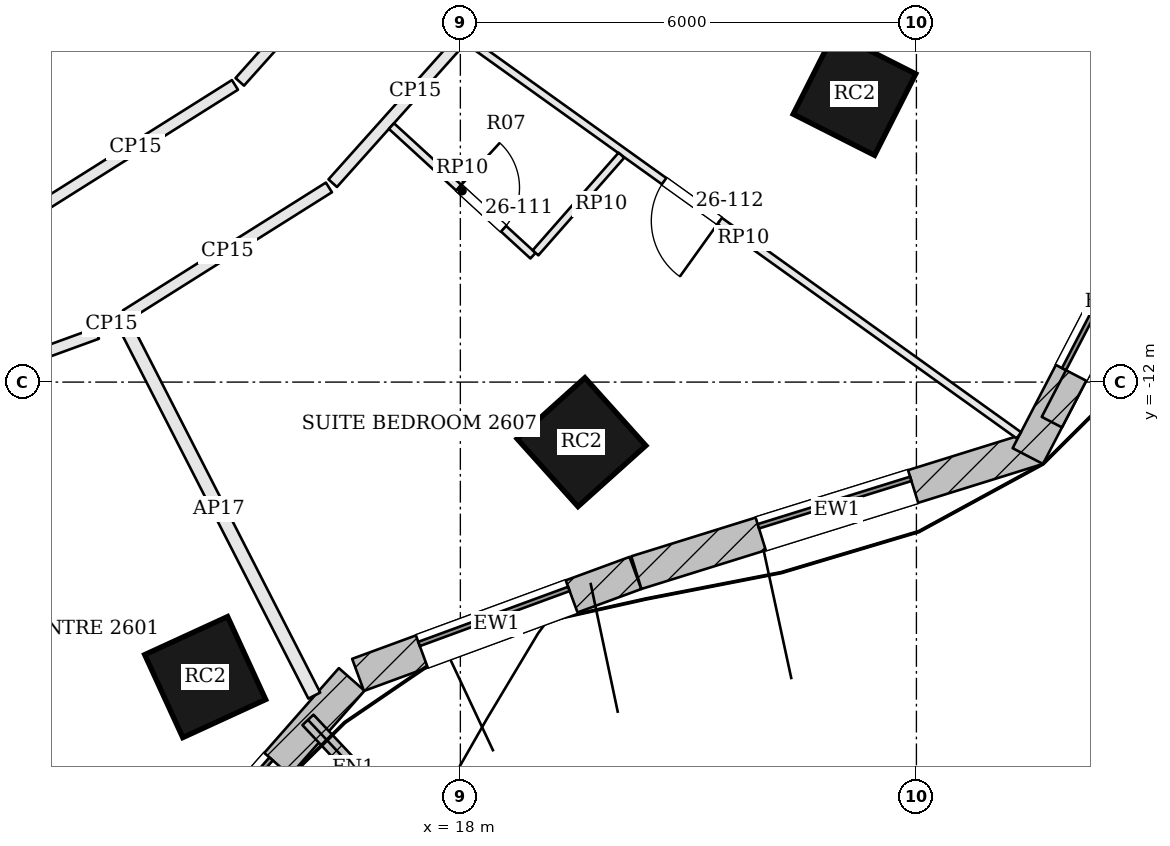
"""IFC4 building model, lengths in metres.
Left out: names, types, materials, properties, quantities, classifications, styles, units other than length and angle.
Written with IfcOpenShell. Run it as: python <this file> out.ifc"""

import sys

from ifc_helpers import new_model, si_unit, direction, frame, frame_2d, origin, origin_2d, place, context, subcontext, project, spatial, rectangle, extrude, element, fill, save


model = new_model("IFC4")
c1 = context("Model", 3, precision=1e-05, world=origin(), true_north=direction((0.0, 1.0)))
c2 = subcontext(c1, "Body", "Model", "MODEL_VIEW")
j1 = project(units=[si_unit("LENGTHUNIT", "METRE"), si_unit("PLANEANGLEUNIT", "RADIAN")], contexts=[c1])
p1 = place(None, origin())
s1 = spatial("IfcSite", under=j1, at=p1, CompositionType="ELEMENT")
p2 = place(p1, origin())
s2 = spatial("IfcBuilding", under=s1, at=p2, CompositionType="ELEMENT")
p3 = place(p2, frame((0.0, 0.0, 110.4)))
s3 = spatial("IfcBuildingStorey", under=s2, at=p3, CompositionType="ELEMENT", Elevation=110.4)
for number, where, z_axis, x_axis in (
    (1, (14.643, -15.881, 0.0), (0.0, 0.0, 1.0), (0.909, 0.417, 0.0)),
    (2, (19.593, -12.79, 0.0), (0.0, 0.0, 1.0), (0.744, 0.668, 0.0)),
    (3, (23.185, -8.21, 0.0), (0.0, 0.0, 1.0), (0.451, 0.893, 0.0)),
):
    element("IfcColumn", number, at=place(p3, frame(where, z_axis=z_axis, x_axis=x_axis)), inside=s3, PredefinedType="COLUMN", context=c2, shape_type="SweptSolid", body=[
        extrude(rectangle(XDim=1.2, YDim=1.2, at=origin_2d()), origin(), (0.0, 0.0, 1.0), 3.6),
    ])
p4 = place(p3, frame((13.221, -19.719, 0.0), z_axis=(0.0, 0.0, 1.0), x_axis=(0.660424908916, 0.750892095899, 0.0)))
e4 = element("IfcWall", 4, at=p4, inside=s3, PredefinedType="SOLIDWALL", context=c2, shape_type="SweptSolid", body=[
    extrude(rectangle(XDim=5.071, YDim=0.45, at=frame_2d((2.535, 0.0))), origin(), (0.0, 0.0, 1.0), 3.4),
])
p5 = place(p4, frame((1.485, 0.0, 0.9)))
e5 = element("IfcOpeningElement", 5, at=p5, cuts=e4, PredefinedType="OPENING", context=c2, shape_type="SweptSolid", body=[
    extrude(rectangle(XDim=2.1, YDim=2.0, at=frame_2d((1.05, 1.0))), frame((0.0, 0.235, 0.0), z_axis=(0.0, -1.0, 0.0), x_axis=(1.0, 0.0, 0.0)), (0.0, 0.0, 1.0), 0.47),
])
p6 = place(p3, frame((16.654, -15.852, 0.0), z_axis=(0.0, 0.0, 1.0), x_axis=(0.938636568132, 0.344907803572, 0.0)))
e6 = element("IfcWall", 6, at=p6, inside=s3, PredefinedType="SOLIDWALL", context=c2, shape_type="SweptSolid", body=[
    extrude(rectangle(XDim=3.887, YDim=0.45, at=frame_2d((1.944, 0.0))), origin(), (0.0, 0.0, 1.0), 3.4),
])
p7 = place(p6, frame((0.894, 0.0, 0.9)))
e7 = element("IfcOpeningElement", 7, at=p7, cuts=e6, PredefinedType="OPENING", context=c2, shape_type="SweptSolid", body=[
    extrude(rectangle(XDim=2.1, YDim=2.0, at=frame_2d((1.05, 1.0))), frame((0.0, 0.235, 0.0), z_axis=(0.0, -1.0, 0.0), x_axis=(1.0, 0.0, 0.0)), (0.0, 0.0, 1.0), 0.47),
])
p8 = place(p3, frame((20.316, -14.507, 0.0), z_axis=(0.0, 0.0, 1.0), x_axis=(0.954807195185, 0.297225873743, 0.0)))
e8 = element("IfcWall", 8, at=p8, inside=s3, PredefinedType="SOLIDWALL", context=c2, shape_type="SweptSolid", body=[
    extrude(rectangle(XDim=5.526, YDim=0.45, at=frame_2d((2.763, 0.0))), origin(), (0.0, 0.0, 1.0), 3.4),
])
p9 = place(p8, frame((1.713, 0.0, 0.9)))
e9 = element("IfcOpeningElement", 9, at=p9, cuts=e8, PredefinedType="OPENING", context=c2, shape_type="SweptSolid", body=[
    extrude(rectangle(XDim=2.1, YDim=2.0, at=frame_2d((1.05, 1.0))), frame((0.0, 0.235, 0.0), z_axis=(0.0, -1.0, 0.0), x_axis=(1.0, 0.0, 0.0)), (0.0, 0.0, 1.0), 0.47),
])
p10 = place(p3, frame((25.465, -12.973, 0.0), z_axis=(0.0, 0.0, 1.0), x_axis=(0.461288789222, 0.887250050965, 0.0)))
e10 = element("IfcWall", 10, at=p10, inside=s3, PredefinedType="SOLIDWALL", context=c2, shape_type="SweptSolid", body=[
    extrude(rectangle(XDim=4.568, YDim=0.45, at=frame_2d((2.284, 0.0))), origin(), (0.0, 0.0, 1.0), 3.4),
])
p11 = place(p10, frame((1.234, 0.0, 0.9)))
e11 = element("IfcOpeningElement", 11, at=p11, cuts=e10, PredefinedType="OPENING", context=c2, shape_type="SweptSolid", body=[
    extrude(rectangle(XDim=2.1, YDim=2.0, at=frame_2d((1.05, 1.0))), frame((0.0, 0.235, 0.0), z_axis=(0.0, -1.0, 0.0), x_axis=(1.0, 0.0, 0.0)), (0.0, 0.0, 1.0), 0.47),
])
p12 = place(p3, frame((27.552, -9.072, 0.0), z_axis=(0.0, 0.0, 1.0), x_axis=(-0.240629941406, 0.970616933347, 0.0)))
e12 = element("IfcWall", 12, at=p12, inside=s3, PredefinedType="SOLIDWALL", context=c2, shape_type="SweptSolid", body=[
    extrude(rectangle(XDim=4.915, YDim=0.45, at=frame_2d((2.457, 0.0))), origin(), (0.0, 0.0, 1.0), 3.4),
])
p13 = place(p12, frame((1.407, 0.0, 0.9)))
e13 = element("IfcOpeningElement", 13, at=p13, cuts=e12, PredefinedType="OPENING", context=c2, shape_type="SweptSolid", body=[
    extrude(rectangle(XDim=2.1, YDim=2.0, at=frame_2d((1.05, 1.0))), frame((0.0, 0.235, 0.0), z_axis=(0.0, -1.0, 0.0), x_axis=(1.0, 0.0, 0.0)), (0.0, 0.0, 1.0), 0.47),
])
p14 = place(p3, frame((15.995, -16.444, 0.0), z_axis=(0.0, 0.0, 1.0), x_axis=(0.683852936488, -0.729619874494, 0.0)))
e14 = element("IfcWall", 14, at=p14, inside=s3, PredefinedType="SOLIDWALL", context=c2, shape_type="SweptSolid", body=[
    extrude(rectangle(XDim=1.75, YDim=0.2, at=frame_2d((0.875, 0.0))), origin(), (0.0, 0.0, 1.0), 3.4),
])
p15 = place(p3, frame((25.782, -12.527, 3.6), z_axis=(0.0, 0.0, 1.0), x_axis=(0.461218103562, 0.88728679746, 0.0)))
e15 = element("IfcWall", 15, at=p15, inside=s3, PredefinedType="PARAPET", context=c2, shape_type="SweptSolid", body=[
    extrude(rectangle(XDim=3.883, YDim=0.3, at=frame_2d((1.941, 0.0))), origin(), (0.0, 0.0, 1.0), 1.1),
])
p16 = place(p3, frame((9.728, -12.631, 0.0), z_axis=(0.0, 0.0, 1.0), x_axis=(0.939626438181, 0.342201923826, 0.0)))
e16 = element("IfcWall", 16, at=p16, inside=s3, PredefinedType="PARTITIONING", context=c2, shape_type="SweptSolid", body=[
    extrude(rectangle(XDim=3.716, YDim=0.15, at=frame_2d((1.858, 0.0))), origin(), (0.0, 0.0, 1.0), 2.784),
])
p17 = place(p16, frame((1.115, 0.0, 0.0)))
e17 = element("IfcOpeningElement", 17, at=p17, cuts=e16, PredefinedType="OPENING", context=c2, shape_type="SweptSolid", body=[
    extrude(rectangle(XDim=1.0, YDim=2.1, at=frame_2d((0.5, 1.05))), frame((0.0, 0.085, 0.0), z_axis=(0.0, -1.0, 0.0), x_axis=(1.0, 0.0, 0.0)), (0.0, 0.0, 1.0), 0.17),
])
p18 = place(p3, frame((13.283, -11.319, 0.0), z_axis=(0.0, 0.0, 1.0), x_axis=(0.846490250249, 0.532404222592, 0.0)))
e18 = element("IfcWall", 18, at=p18, inside=s3, PredefinedType="PARTITIONING", context=c2, shape_type="SweptSolid", body=[
    extrude(rectangle(XDim=0.301, YDim=0.15, at=frame_2d((0.15, 0.0))), origin(), (0.0, 0.0, 1.0), 2.784),
])
p19 = place(p3, frame((16.078, -16.125, 0.0), z_axis=(0.0, 0.0, 1.0), x_axis=(-0.455535500666, 0.890217618132, 0.0)))
e19 = element("IfcWall", 19, at=p19, inside=s3, PredefinedType="PARTITIONING", context=c2, shape_type="SweptSolid", body=[
    extrude(rectangle(XDim=5.502, YDim=0.175, at=frame_2d((2.751, 0.0))), origin(), (0.0, 0.0, 1.0), 2.784),
])
p20 = place(p3, frame((13.601, -11.119, 0.0), z_axis=(0.0, 0.0, 1.0), x_axis=(0.846302624213, 0.532702419978, 0.0)))
e20 = element("IfcWall", 20, at=p20, inside=s3, PredefinedType="PARTITIONING", context=c2, shape_type="SweptSolid", body=[
    extrude(rectangle(XDim=3.155, YDim=0.15, at=frame_2d((1.577, 0.0))), origin(), (0.0, 0.0, 1.0), 2.784),
])
p21 = place(p3, frame((16.321, -9.383, 0.0), z_axis=(0.0, 0.0, 1.0), x_axis=(0.666834356165, 0.745205972492, 0.0)))
e21 = element("IfcWall", 21, at=p21, inside=s3, PredefinedType="PARTITIONING", context=c2, shape_type="SweptSolid", body=[
    extrude(rectangle(XDim=3.252, YDim=0.15, at=frame_2d((1.626, 0.0))), origin(), (0.0, 0.0, 1.0), 2.784),
])
p22 = place(p3, frame((16.925, -6.009, 0.0), z_axis=(0.0, 0.0, 1.0), x_axis=(-0.666893859891, -0.745152722359, 0.0)))
e22 = element("IfcWall", 22, at=p22, inside=s3, PredefinedType="PARTITIONING", context=c2, shape_type="SweptSolid", body=[
    extrude(rectangle(XDim=2.739, YDim=0.15, at=frame_2d((1.37, 0.0))), origin(), (0.0, 0.0, 1.0), 2.784),
])
p23 = place(p3, frame((15.034, -8.09, 0.0), z_axis=(0.0, 0.0, 1.0), x_axis=(-0.846322679414, -0.532670557014, 0.0)))
e23 = element("IfcWall", 23, at=p23, inside=s3, PredefinedType="PARTITIONING", context=c2, shape_type="SweptSolid", body=[
    extrude(rectangle(XDim=3.085, YDim=0.15, at=frame_2d((1.543, 0.0))), origin(), (0.0, 0.0, 1.0), 2.784),
])
p24 = place(p3, frame((25.348, -12.7, 0.0), z_axis=(0.0, 0.0, 1.0), x_axis=(-0.812896417151, 0.582408288903, 0.0)))
e24 = element("IfcWall", 24, at=p24, inside=s3, PredefinedType="PARTITIONING", context=c2, shape_type="SweptSolid", body=[
    extrude(rectangle(XDim=8.917, YDim=0.1, at=frame_2d((4.458, 0.0))), origin(), (0.0, 0.0, 1.0), 2.884),
])
p25 = place(p24, frame((4.842, 0.0, 0.0)))
e25 = element("IfcOpeningElement", 25, at=p25, cuts=e24, PredefinedType="OPENING", context=c2, shape_type="SweptSolid", body=[
    extrude(rectangle(XDim=0.9, YDim=2.4, at=frame_2d((0.45, 1.2))), frame((0.0, 0.06, 0.0), z_axis=(0.0, -1.0, 0.0), x_axis=(1.0, 0.0, 0.0)), (0.0, 0.0, 1.0), 0.12),
])
p26 = place(p3, frame((17.094, -8.632, 0.0), z_axis=(0.0, 0.0, 1.0), x_axis=(0.737555367088, -0.675286665409, 0.0)))
e26 = element("IfcWall", 26, at=p26, inside=s3, PredefinedType="PARTITIONING", context=c2, shape_type="SweptSolid", body=[
    extrude(rectangle(XDim=2.525, YDim=0.1, at=frame_2d((1.262, 0.0))), origin(), (0.0, 0.0, 1.0), 2.884),
])
p27 = place(p26, frame((1.2, 0.0, 0.0)))
e27 = element("IfcOpeningElement", 27, at=p27, cuts=e26, PredefinedType="OPENING", context=c2, shape_type="SweptSolid", body=[
    extrude(rectangle(XDim=0.8, YDim=2.1, at=frame_2d((0.4, 1.05))), frame((0.0, 0.06, 0.0), z_axis=(0.0, -1.0, 0.0), x_axis=(1.0, 0.0, 0.0)), (0.0, 0.0, 1.0), 0.12),
])
p28 = place(p3, frame((18.989, -10.3, 0.0), z_axis=(0.0, 0.0, 1.0), x_axis=(0.66057320525, 0.750761640273, 0.0)))
e28 = element("IfcWall", 28, at=p28, inside=s3, PredefinedType="PARTITIONING", context=c2, shape_type="SweptSolid", body=[
    extrude(rectangle(XDim=1.711, YDim=0.1, at=frame_2d((0.855, 0.0))), origin(), (0.0, 0.0, 1.0), 2.884),
])
p29 = place(p5, origin())
e29 = element("IfcWindow", 29, at=p29, inside=s3, PartitioningType="SINGLE_PANEL", PredefinedType="WINDOW", context=c2, shape_type="SweptSolid", body=[
    extrude(rectangle(XDim=2.1, YDim=2.0, at=frame_2d((1.05, 1.0))), frame((0.0, 0.135, 0.0), z_axis=(0.0, -1.0, 0.0), x_axis=(1.0, 0.0, 0.0)), (0.0, 0.0, 1.0), 0.06),
])
fill(e5, e29)
p30 = place(p7, origin())
e30 = element("IfcWindow", 30, at=p30, inside=s3, PartitioningType="SINGLE_PANEL", PredefinedType="WINDOW", context=c2, shape_type="SweptSolid", body=[
    extrude(rectangle(XDim=2.1, YDim=2.0, at=frame_2d((1.05, 1.0))), frame((0.0, 0.135, 0.0), z_axis=(0.0, -1.0, 0.0), x_axis=(1.0, 0.0, 0.0)), (0.0, 0.0, 1.0), 0.06),
])
fill(e7, e30)
p31 = place(p9, origin())
e31 = element("IfcWindow", 31, at=p31, inside=s3, PartitioningType="SINGLE_PANEL", PredefinedType="WINDOW", context=c2, shape_type="SweptSolid", body=[
    extrude(rectangle(XDim=2.1, YDim=2.0, at=frame_2d((1.05, 1.0))), frame((0.0, 0.135, 0.0), z_axis=(0.0, -1.0, 0.0), x_axis=(1.0, 0.0, 0.0)), (0.0, 0.0, 1.0), 0.06),
])
fill(e9, e31)
p32 = place(p11, origin())
e32 = element("IfcWindow", 32, at=p32, inside=s3, PartitioningType="SINGLE_PANEL", PredefinedType="WINDOW", context=c2, shape_type="SweptSolid", body=[
    extrude(rectangle(XDim=2.1, YDim=2.0, at=frame_2d((1.05, 1.0))), frame((0.0, 0.135, 0.0), z_axis=(0.0, -1.0, 0.0), x_axis=(1.0, 0.0, 0.0)), (0.0, 0.0, 1.0), 0.06),
])
fill(e11, e32)
p33 = place(p27, origin())
e33 = element("IfcDoor", 33, at=p33, inside=s3, OperationType="SINGLE_SWING_LEFT", PredefinedType="DOOR", context=c2, shape_type="SweptSolid", body=[
    extrude(rectangle(XDim=0.8, YDim=2.1, at=frame_2d((0.4, 1.05))), frame((0.0, 0.025, 0.0), z_axis=(0.0, -1.0, 0.0), x_axis=(1.0, 0.0, 0.0)), (0.0, 0.0, 1.0), 0.05),
])
fill(e27, e33)
p34 = place(p25, origin())
e34 = element("IfcDoor", 34, at=p34, inside=s3, OperationType="SINGLE_SWING_LEFT", PredefinedType="DOOR", context=c2, shape_type="SweptSolid", body=[
    extrude(rectangle(XDim=0.9, YDim=2.4, at=frame_2d((0.45, 1.2))), frame((0.0, 0.025, 0.0), z_axis=(0.0, -1.0, 0.0), x_axis=(1.0, 0.0, 0.0)), (0.0, 0.0, 1.0), 0.05),
])
fill(e25, e34)
save(model, sys.argv[1])
